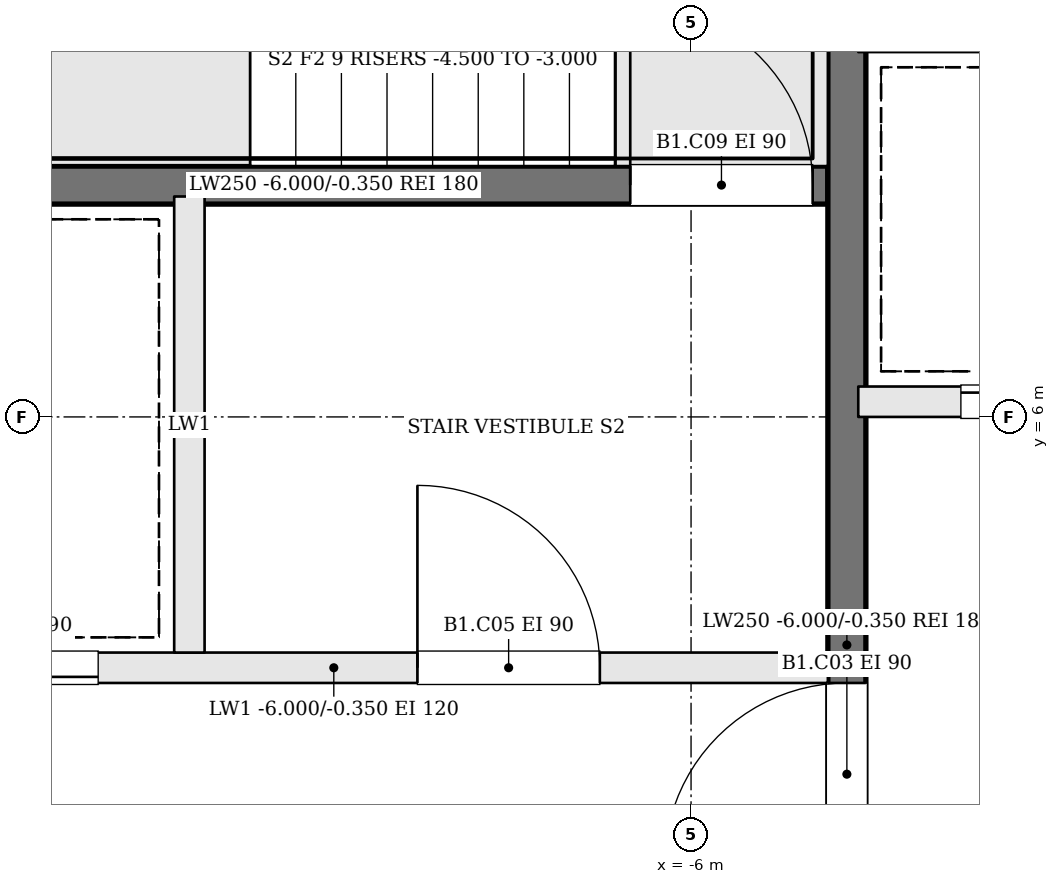
"""IFC4 building model, lengths in metres.
Left out: names, types, materials, properties, quantities, classifications, styles, units other than length and angle.
Written with IfcOpenShell. Run it as: python <this file> out.ifc"""

import sys

from ifc_helpers import new_model, si_unit, direction, frame, frame_2d, origin, place, context, subcontext, project, spatial, rectangle, extrude, element, fill, save


model = new_model("IFC4")
c1 = context("Model", 3, precision=1e-05, world=origin(), true_north=direction((0.0, 1.0)))
c2 = subcontext(c1, "Body", "Model", "MODEL_VIEW")
j1 = project(units=[si_unit("LENGTHUNIT", "METRE"), si_unit("PLANEANGLEUNIT", "RADIAN")], contexts=[c1])
p1 = place(None, origin())
s1 = spatial("IfcSite", under=j1, at=p1, CompositionType="ELEMENT")
p2 = place(p1, origin())
s2 = spatial("IfcBuilding", under=s1, at=p2, CompositionType="ELEMENT")
p3 = place(p2, frame((0.0, 0.0, -6.0)))
s3 = spatial("IfcBuildingStorey", under=s2, at=p3, CompositionType="ELEMENT", Elevation=-6.0)
p4 = place(p3, frame((-11.6, 4.35, 0.0), z_axis=(0.0, 0.0, 1.0), x_axis=(1.0, 0.0, 0.0)))
e1 = element("IfcWall", 1, at=p4, inside=s3, PredefinedType="SOLIDWALL", context=c2, shape_type="SweptSolid", body=[
    extrude(rectangle(XDim=6.5, YDim=0.2, at=frame_2d((3.25, 0.0))), origin(), (0.0, 0.0, 1.0), 5.65),
])
p5 = place(p4, frame((3.8, 0.0, 0.0)))
e2 = element("IfcOpeningElement", 2, at=p5, cuts=e1, PredefinedType="OPENING", context=c2, shape_type="SweptSolid", body=[
    extrude(rectangle(XDim=1.2, YDim=2.1, at=frame_2d((0.6, 1.05))), frame((0.0, 0.11, 0.0), z_axis=(0.0, -1.0, 0.0), x_axis=(1.0, 0.0, 0.0)), (0.0, 0.0, 1.0), 0.22),
])
p6 = place(p4, frame((0.5, 0.0, 0.0)))
e3 = element("IfcOpeningElement", 3, at=p6, cuts=e1, PredefinedType="OPENING", context=c2, shape_type="SweptSolid", body=[
    extrude(rectangle(XDim=1.2, YDim=2.1, at=frame_2d((0.6, 1.05))), frame((0.0, 0.11, 0.0), z_axis=(0.0, -1.0, 0.0), x_axis=(1.0, 0.0, 0.0)), (0.0, 0.0, 1.0), 0.22),
])
p7 = place(p3, frame((-11.6, 7.525, 0.0), z_axis=(0.0, 0.0, 1.0), x_axis=(1.0, 0.0, 0.0)))
e4 = element("IfcWall", 4, at=p7, inside=s3, PredefinedType="SOLIDWALL", context=c2, shape_type="SweptSolid", body=[
    extrude(rectangle(XDim=6.5, YDim=0.25, at=frame_2d((3.25, 0.0))), origin(), (0.0, 0.0, 1.0), 5.65),
])
p8 = place(p7, frame((5.2, 0.0, 0.0)))
e5 = element("IfcOpeningElement", 5, at=p8, cuts=e4, PredefinedType="OPENING", context=c2, shape_type="SweptSolid", body=[
    extrude(rectangle(XDim=1.2, YDim=2.1, at=frame_2d((0.6, 1.05))), frame((0.0, 0.135, 0.0), z_axis=(0.0, -1.0, 0.0), x_axis=(1.0, 0.0, 0.0)), (0.0, 0.0, 1.0), 0.27),
])
p9 = place(p3, frame((-9.3, 4.45, 0.0), z_axis=(0.0, 0.0, 1.0), x_axis=(0.0, 1.0, 0.0)))
e6 = element("IfcWall", 6, at=p9, inside=s3, PredefinedType="SOLIDWALL", context=c2, shape_type="SweptSolid", body=[
    extrude(rectangle(XDim=3.0, YDim=0.2, at=frame_2d((1.5, 0.0))), origin(), (0.0, 0.0, 1.0), 5.65),
])
p10 = place(p3, frame((-4.975, -1.6, 0.0), z_axis=(0.0, 0.0, 1.0), x_axis=(0.0, 1.0, 0.0)))
e7 = element("IfcWall", 7, at=p10, inside=s3, PredefinedType="SOLIDWALL", context=c2, shape_type="SweptSolid", body=[
    extrude(rectangle(XDim=12.2, YDim=0.25, at=frame_2d((6.1, 0.0))), origin(), (0.0, 0.0, 1.0), 5.65),
])
p11 = place(p10, frame((4.65, 0.0, 0.0)))
e8 = element("IfcOpeningElement", 8, at=p11, cuts=e7, PredefinedType="OPENING", context=c2, shape_type="SweptSolid", body=[
    extrude(rectangle(XDim=1.2, YDim=2.1, at=frame_2d((0.6, 1.05))), frame((0.0, 0.135, 0.0), z_axis=(0.0, -1.0, 0.0), x_axis=(1.0, 0.0, 0.0)), (0.0, 0.0, 1.0), 0.27),
])
p12 = place(p3, frame((-4.9, 6.1, 0.0), z_axis=(0.0, 0.0, 1.0), x_axis=(1.0, 0.0, 0.0)))
e9 = element("IfcWall", 9, at=p12, inside=s3, PredefinedType="SOLIDWALL", context=c2, shape_type="SweptSolid", body=[
    extrude(rectangle(XDim=9.8, YDim=0.2, at=frame_2d((4.9, 0.0))), origin(), (0.0, 0.0, 1.0), 5.65),
])
p13 = place(p12, frame((0.675, 0.0, 0.0)))
e10 = element("IfcOpeningElement", 10, at=p13, cuts=e9, PredefinedType="OPENING", context=c2, shape_type="SweptSolid", body=[
    extrude(rectangle(XDim=1.1, YDim=2.1, at=frame_2d((0.55, 1.05))), frame((0.0, 0.11, 0.0), z_axis=(0.0, -1.0, 0.0), x_axis=(1.0, 0.0, 0.0)), (0.0, 0.0, 1.0), 0.22),
])
p14 = place(p12, frame((3.125, 0.0, 0.0)))
e11 = element("IfcOpeningElement", 11, at=p14, cuts=e9, PredefinedType="OPENING", context=c2, shape_type="SweptSolid", body=[
    extrude(rectangle(XDim=1.1, YDim=2.1, at=frame_2d((0.55, 1.05))), frame((0.0, 0.11, 0.0), z_axis=(0.0, -1.0, 0.0), x_axis=(1.0, 0.0, 0.0)), (0.0, 0.0, 1.0), 0.22),
])
p15 = place(p12, frame((5.575, 0.0, 0.0)))
e12 = element("IfcOpeningElement", 12, at=p15, cuts=e9, PredefinedType="OPENING", context=c2, shape_type="SweptSolid", body=[
    extrude(rectangle(XDim=1.1, YDim=2.1, at=frame_2d((0.55, 1.05))), frame((0.0, 0.11, 0.0), z_axis=(0.0, -1.0, 0.0), x_axis=(1.0, 0.0, 0.0)), (0.0, 0.0, 1.0), 0.22),
])
p16 = place(p12, frame((8.025, 0.0, 0.0)))
e13 = element("IfcOpeningElement", 13, at=p16, cuts=e9, PredefinedType="OPENING", context=c2, shape_type="SweptSolid", body=[
    extrude(rectangle(XDim=1.1, YDim=2.1, at=frame_2d((0.55, 1.05))), frame((0.0, 0.11, 0.0), z_axis=(0.0, -1.0, 0.0), x_axis=(1.0, 0.0, 0.0)), (0.0, 0.0, 1.0), 0.22),
])
p17 = place(p11, origin())
e14 = element("IfcDoor", 14, at=p17, inside=s3, OperationType="SINGLE_SWING_LEFT", PredefinedType="DOOR", context=c2, shape_type="SweptSolid", body=[
    extrude(rectangle(XDim=1.2, YDim=2.1, at=frame_2d((0.6, 1.05))), frame((0.0, 0.025, 0.0), z_axis=(0.0, -1.0, 0.0), x_axis=(1.0, 0.0, 0.0)), (0.0, 0.0, 1.0), 0.05),
])
fill(e8, e14)
p18 = place(p5, origin())
e15 = element("IfcDoor", 15, at=p18, inside=s3, OperationType="SINGLE_SWING_LEFT", PredefinedType="DOOR", context=c2, shape_type="SweptSolid", body=[
    extrude(rectangle(XDim=1.2, YDim=2.1, at=frame_2d((0.6, 1.05))), frame((0.0, 0.025, 0.0), z_axis=(0.0, -1.0, 0.0), x_axis=(1.0, 0.0, 0.0)), (0.0, 0.0, 1.0), 0.05),
])
fill(e2, e15)
p19 = place(p8, origin())
e16 = element("IfcDoor", 16, at=p19, inside=s3, OperationType="SINGLE_SWING_LEFT", PredefinedType="DOOR", context=c2, shape_type="SweptSolid", body=[
    extrude(rectangle(XDim=1.2, YDim=2.1, at=frame_2d((0.6, 1.05))), frame((0.0, 0.025, 0.0), z_axis=(0.0, -1.0, 0.0), x_axis=(1.0, 0.0, 0.0)), (0.0, 0.0, 1.0), 0.05),
])
fill(e5, e16)
p20 = place(p6, origin())
e17 = element("IfcDoor", 17, at=p20, inside=s3, OperationType="SLIDING_TO_RIGHT", PredefinedType="DOOR", context=c2, shape_type="SweptSolid", body=[
    extrude(rectangle(XDim=1.2, YDim=2.1, at=frame_2d((0.6, 1.05))), frame((0.0, 0.025, 0.0), z_axis=(0.0, -1.0, 0.0), x_axis=(1.0, 0.0, 0.0)), (0.0, 0.0, 1.0), 0.05),
])
fill(e3, e17)
p21 = place(p13, origin())
e18 = element("IfcDoor", 18, at=p21, inside=s3, OperationType="SLIDING_TO_RIGHT", PredefinedType="DOOR", context=c2, shape_type="SweptSolid", body=[
    extrude(rectangle(XDim=1.1, YDim=2.1, at=frame_2d((0.55, 1.05))), frame((0.0, 0.025, 0.0), z_axis=(0.0, -1.0, 0.0), x_axis=(1.0, 0.0, 0.0)), (0.0, 0.0, 1.0), 0.05),
])
fill(e10, e18)
save(model, sys.argv[1])
